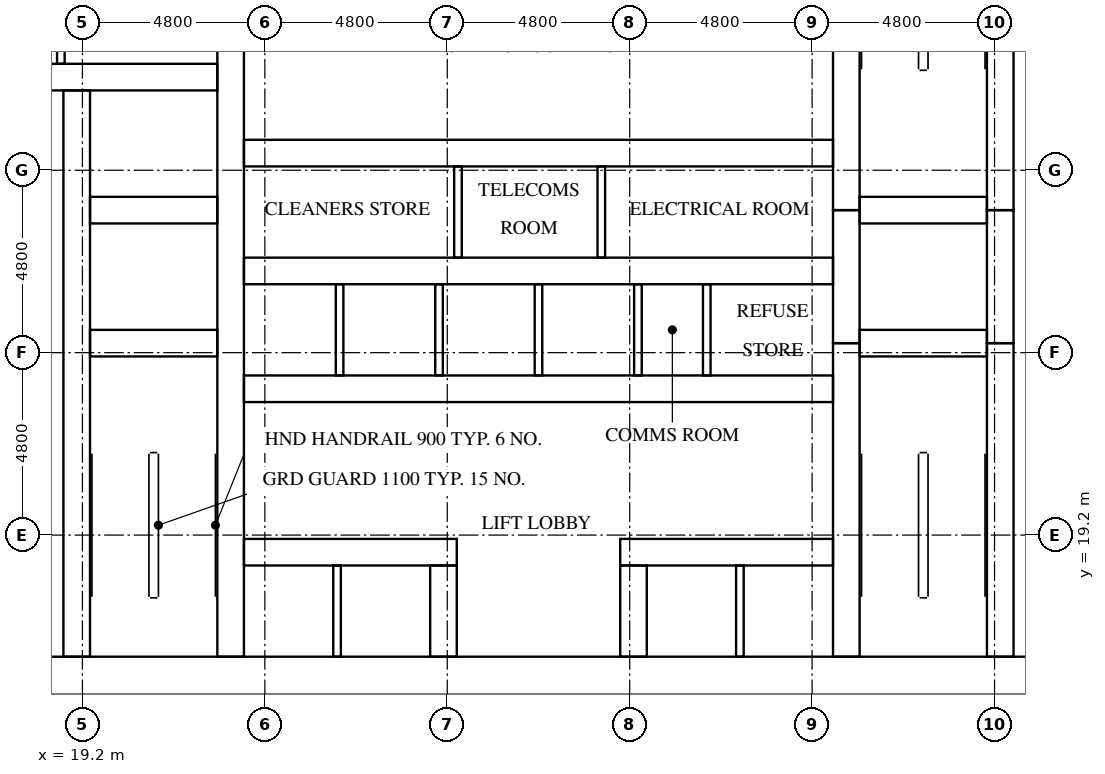
"""IFC4 building model, lengths in metres.
Left out: names, types, materials, properties, quantities, classifications, styles, units other than length and angle.
Written with IfcOpenShell. Run it as: python <this file> out.ifc"""

import sys

from ifc_helpers import new_model, si_unit, direction, frame, frame_2d, origin, place, context, subcontext, project, spatial, rectangle, extrude, element, fill, save


model = new_model("IFC4")
c1 = context("Model", 3, precision=1e-05, world=origin(), true_north=direction((0.0, 1.0)))
c2 = subcontext(c1, "Body", "Model", "MODEL_VIEW")
j1 = project(units=[si_unit("LENGTHUNIT", "METRE"), si_unit("PLANEANGLEUNIT", "RADIAN")], contexts=[c1])
p1 = place(None, origin())
s1 = spatial("IfcSite", under=j1, at=p1, CompositionType="ELEMENT")
p2 = place(p1, origin())
s2 = spatial("IfcBuilding", under=s1, at=p2, CompositionType="ELEMENT")
p3 = place(p2, frame((0.0, 0.0, 19.5)))
s3 = spatial("IfcBuildingStorey", under=s2, at=p3, CompositionType="ELEMENT", Elevation=19.5)
p4 = place(p3, frame((15.0, 15.5, 0.0), z_axis=(0.0, 0.0, 1.0), x_axis=(1.0, 0.0, 0.0)))
e1 = element("IfcWall", 1, at=p4, inside=s3, PredefinedType="SHEAR", context=c2, shape_type="SweptSolid", body=[
    extrude(rectangle(XDim=32.4, YDim=1.0, at=frame_2d((16.2, 0.0))), origin(), (0.0, 0.0, 1.0), 4.1),
])
p5 = place(p4, frame((15.3, 0.0, 0.0)))
e2 = element("IfcOpeningElement", 2, at=p5, cuts=e1, PredefinedType="OPENING", context=c2, shape_type="SweptSolid", body=[
    extrude(rectangle(XDim=1.8, YDim=2.1, at=frame_2d((0.9, 1.05))), frame((0.0, 0.51, 0.0), z_axis=(0.0, -1.0, 0.0), x_axis=(1.0, 0.0, 0.0)), (0.0, 0.0, 1.0), 1.02),
])
p6 = place(p3, frame((19.05, 16.0, 0.0), z_axis=(0.0, 0.0, 1.0), x_axis=(0.0, 1.0, 0.0)))
e3 = element("IfcWall", 3, at=p6, inside=s3, PredefinedType="SHEAR", context=c2, shape_type="SweptSolid", body=[
    extrude(rectangle(XDim=14.9, YDim=0.7, at=frame_2d((7.45, 0.0))), origin(), (0.0, 0.0, 1.0), 4.1),
])
p7 = place(p6, frame((9.45, 0.0, 0.0)))
e4 = element("IfcOpeningElement", 4, at=p7, cuts=e3, PredefinedType="OPENING", context=c2, shape_type="SweptSolid", body=[
    extrude(rectangle(XDim=1.1, YDim=2.1, at=frame_2d((0.55, 1.05))), frame((0.0, 0.36, 0.0), z_axis=(0.0, -1.0, 0.0), x_axis=(1.0, 0.0, 0.0)), (0.0, 0.0, 1.0), 0.72),
])
p8 = place(p6, frame((12.95, 0.0, 0.0)))
e5 = element("IfcOpeningElement", 5, at=p8, cuts=e3, PredefinedType="OPENING", context=c2, shape_type="SweptSolid", body=[
    extrude(rectangle(XDim=1.1, YDim=2.1, at=frame_2d((0.55, 1.05))), frame((0.0, 0.36, 0.0), z_axis=(0.0, -1.0, 0.0), x_axis=(1.0, 0.0, 0.0)), (0.0, 0.0, 1.0), 0.72),
])
p9 = place(p6, frame((0.2, 0.0, 0.0)))
e6 = element("IfcOpeningElement", 6, at=p9, cuts=e3, PredefinedType="OPENING", context=c2, shape_type="SweptSolid", body=[
    extrude(rectangle(XDim=1.2, YDim=2.1, at=frame_2d((0.6, 1.05))), frame((0.0, 0.36, 0.0), z_axis=(0.0, -1.0, 0.0), x_axis=(1.0, 0.0, 0.0)), (0.0, 0.0, 1.0), 0.72),
])
p10 = place(p3, frame((23.1, 16.0, 0.0), z_axis=(0.0, 0.0, 1.0), x_axis=(0.0, 1.0, 0.0)))
e7 = element("IfcWall", 7, at=p10, inside=s3, PredefinedType="SHEAR", context=c2, shape_type="SweptSolid", body=[
    extrude(rectangle(XDim=20.8, YDim=0.7, at=frame_2d((10.4, 0.0))), origin(), (0.0, 0.0, 1.0), 4.1),
])
p11 = place(p3, frame((39.3, 16.0, 0.0), z_axis=(0.0, 0.0, 1.0), x_axis=(0.0, 1.0, 0.0)))
e8 = element("IfcWall", 8, at=p11, inside=s3, PredefinedType="SHEAR", context=c2, shape_type="SweptSolid", body=[
    extrude(rectangle(XDim=8.25, YDim=0.7, at=frame_2d((4.125, 0.0))), origin(), (0.0, 0.0, 1.0), 4.1),
])
p12 = place(p3, frame((39.3, 24.25, 0.0), z_axis=(0.0, 0.0, 1.0), x_axis=(0.0, 1.0, 0.0)))
e9 = element("IfcWall", 9, at=p12, inside=s3, PredefinedType="SHEAR", context=c2, shape_type="SweptSolid", body=[
    extrude(rectangle(XDim=3.5, YDim=0.7, at=frame_2d((1.75, 0.0))), origin(), (0.0, 0.0, 1.0), 4.1),
])
p13 = place(p3, frame((39.3, 27.75, 0.0), z_axis=(0.0, 0.0, 1.0), x_axis=(0.0, 1.0, 0.0)))
e10 = element("IfcWall", 10, at=p13, inside=s3, PredefinedType="SHEAR", context=c2, shape_type="SweptSolid", body=[
    extrude(rectangle(XDim=9.05, YDim=0.7, at=frame_2d((4.525, 0.0))), origin(), (0.0, 0.0, 1.0), 4.1),
])
p14 = place(p3, frame((43.35, 16.0, 0.0), z_axis=(0.0, 0.0, 1.0), x_axis=(0.0, 1.0, 0.0)))
e11 = element("IfcWall", 11, at=p14, inside=s3, PredefinedType="SHEAR", context=c2, shape_type="SweptSolid", body=[
    extrude(rectangle(XDim=8.25, YDim=0.7, at=frame_2d((4.125, 0.0))), origin(), (0.0, 0.0, 1.0), 4.1),
])
p15 = place(p14, frame((0.2, 0.0, 0.0)))
e12 = element("IfcOpeningElement", 12, at=p15, cuts=e11, PredefinedType="OPENING", context=c2, shape_type="SweptSolid", body=[
    extrude(rectangle(XDim=1.2, YDim=2.1, at=frame_2d((0.6, 1.05))), frame((0.0, 0.36, 0.0), z_axis=(0.0, -1.0, 0.0), x_axis=(1.0, 0.0, 0.0)), (0.0, 0.0, 1.0), 0.72),
])
p16 = place(p3, frame((43.35, 24.25, 0.0), z_axis=(0.0, 0.0, 1.0), x_axis=(0.0, 1.0, 0.0)))
e13 = element("IfcWall", 13, at=p16, inside=s3, PredefinedType="SHEAR", context=c2, shape_type="SweptSolid", body=[
    extrude(rectangle(XDim=3.5, YDim=0.7, at=frame_2d((1.75, 0.0))), origin(), (0.0, 0.0, 1.0), 4.1),
])
p17 = place(p16, frame((1.2, 0.0, 0.0)))
e14 = element("IfcOpeningElement", 14, at=p17, cuts=e13, PredefinedType="OPENING", context=c2, shape_type="SweptSolid", body=[
    extrude(rectangle(XDim=1.1, YDim=2.1, at=frame_2d((0.55, 1.05))), frame((0.0, 0.36, 0.0), z_axis=(0.0, -1.0, 0.0), x_axis=(1.0, 0.0, 0.0)), (0.0, 0.0, 1.0), 0.72),
])
p18 = place(p3, frame((43.35, 27.75, 0.0), z_axis=(0.0, 0.0, 1.0), x_axis=(0.0, 1.0, 0.0)))
e15 = element("IfcWall", 15, at=p18, inside=s3, PredefinedType="SHEAR", context=c2, shape_type="SweptSolid", body=[
    extrude(rectangle(XDim=9.05, YDim=0.7, at=frame_2d((4.525, 0.0))), origin(), (0.0, 0.0, 1.0), 4.1),
])
p19 = place(p18, frame((7.65, 0.0, 0.0)))
e16 = element("IfcOpeningElement", 16, at=p19, cuts=e15, PredefinedType="OPENING", context=c2, shape_type="SweptSolid", body=[
    extrude(rectangle(XDim=1.2, YDim=2.1, at=frame_2d((0.6, 1.05))), frame((0.0, 0.36, 0.0), z_axis=(0.0, -1.0, 0.0), x_axis=(1.0, 0.0, 0.0)), (0.0, 0.0, 1.0), 0.72),
])
for number, where, z_axis, x_axis in (
    (17, (19.4, 24.25, 0.0), (0.0, 0.0, 1.0), (1.0, 0.0, 0.0)),
    (18, (19.4, 27.75, 0.0), (0.0, 0.0, 1.0), (1.0, 0.0, 0.0)),
):
    element("IfcWall", number, at=place(p3, frame(where, z_axis=z_axis, x_axis=x_axis)), inside=s3, PredefinedType="SHEAR", context=c2, shape_type="SweptSolid", body=[
        extrude(rectangle(XDim=3.35, YDim=0.7, at=frame_2d((1.675, 0.0))), origin(), (0.0, 0.0, 1.0), 4.1),
    ])
p20 = place(p3, frame((16.0, 31.25, 0.0), z_axis=(0.0, 0.0, 1.0), x_axis=(1.0, 0.0, 0.0)))
e19 = element("IfcWall", 19, at=p20, inside=s3, PredefinedType="SHEAR", context=c2, shape_type="SweptSolid", body=[
    extrude(rectangle(XDim=6.75, YDim=0.7, at=frame_2d((3.375, 0.0))), origin(), (0.0, 0.0, 1.0), 4.1),
])
for number, where, z_axis, x_axis in (
    (20, (39.65, 24.25, 0.0), (0.0, 0.0, 1.0), (1.0, 0.0, 0.0)),
    (21, (39.65, 27.75, 0.0), (0.0, 0.0, 1.0), (1.0, 0.0, 0.0)),
):
    element("IfcWall", number, at=place(p3, frame(where, z_axis=z_axis, x_axis=x_axis)), inside=s3, PredefinedType="SHEAR", context=c2, shape_type="SweptSolid", body=[
        extrude(rectangle(XDim=3.35, YDim=0.7, at=frame_2d((1.675, 0.0))), origin(), (0.0, 0.0, 1.0), 4.1),
    ])
p21 = place(p3, frame((23.45, 18.75, 0.0), z_axis=(0.0, 0.0, 1.0), x_axis=(1.0, 0.0, 0.0)))
e22 = element("IfcWall", 22, at=p21, inside=s3, PredefinedType="SHEAR", context=c2, shape_type="SweptSolid", body=[
    extrude(rectangle(XDim=5.6, YDim=0.7, at=frame_2d((2.8, 0.0))), origin(), (0.0, 0.0, 1.0), 4.1),
])
p22 = place(p21, frame((0.625, 0.0, 0.0)))
e23 = element("IfcOpeningElement", 23, at=p22, cuts=e22, PredefinedType="OPENING", context=c2, shape_type="SweptSolid", body=[
    extrude(rectangle(XDim=1.1, YDim=2.1, at=frame_2d((0.55, 1.05))), frame((0.0, 0.36, 0.0), z_axis=(0.0, -1.0, 0.0), x_axis=(1.0, 0.0, 0.0)), (0.0, 0.0, 1.0), 0.72),
])
p23 = place(p21, frame((3.175, 0.0, 0.0)))
e24 = element("IfcOpeningElement", 24, at=p23, cuts=e22, PredefinedType="OPENING", context=c2, shape_type="SweptSolid", body=[
    extrude(rectangle(XDim=1.1, YDim=2.1, at=frame_2d((0.55, 1.05))), frame((0.0, 0.36, 0.0), z_axis=(0.0, -1.0, 0.0), x_axis=(1.0, 0.0, 0.0)), (0.0, 0.0, 1.0), 0.72),
])
p24 = place(p3, frame((33.35, 18.75, 0.0), z_axis=(0.0, 0.0, 1.0), x_axis=(1.0, 0.0, 0.0)))
e25 = element("IfcWall", 25, at=p24, inside=s3, PredefinedType="SHEAR", context=c2, shape_type="SweptSolid", body=[
    extrude(rectangle(XDim=5.6, YDim=0.7, at=frame_2d((2.8, 0.0))), origin(), (0.0, 0.0, 1.0), 4.1),
])
p25 = place(p24, frame((1.325, 0.0, 0.0)))
e26 = element("IfcOpeningElement", 26, at=p25, cuts=e25, PredefinedType="OPENING", context=c2, shape_type="SweptSolid", body=[
    extrude(rectangle(XDim=1.1, YDim=2.1, at=frame_2d((0.55, 1.05))), frame((0.0, 0.36, 0.0), z_axis=(0.0, -1.0, 0.0), x_axis=(1.0, 0.0, 0.0)), (0.0, 0.0, 1.0), 0.72),
])
p26 = place(p24, frame((3.875, 0.0, 0.0)))
e27 = element("IfcOpeningElement", 27, at=p26, cuts=e25, PredefinedType="OPENING", context=c2, shape_type="SweptSolid", body=[
    extrude(rectangle(XDim=1.1, YDim=2.1, at=frame_2d((0.55, 1.05))), frame((0.0, 0.36, 0.0), z_axis=(0.0, -1.0, 0.0), x_axis=(1.0, 0.0, 0.0)), (0.0, 0.0, 1.0), 0.72),
])
p27 = place(p3, frame((23.45, 23.05, 0.0), z_axis=(0.0, 0.0, 1.0), x_axis=(1.0, 0.0, 0.0)))
e28 = element("IfcWall", 28, at=p27, inside=s3, PredefinedType="SHEAR", context=c2, shape_type="SweptSolid", body=[
    extrude(rectangle(XDim=15.5, YDim=0.7, at=frame_2d((7.75, 0.0))), origin(), (0.0, 0.0, 1.0), 4.1),
])
p28 = place(p27, frame((0.658, 0.0, 0.0)))
e29 = element("IfcOpeningElement", 29, at=p28, cuts=e28, PredefinedType="OPENING", context=c2, shape_type="SweptSolid", body=[
    extrude(rectangle(XDim=1.1, YDim=2.1, at=frame_2d((0.55, 1.05))), frame((0.0, 0.36, 0.0), z_axis=(0.0, -1.0, 0.0), x_axis=(1.0, 0.0, 0.0)), (0.0, 0.0, 1.0), 0.72),
])
p29 = place(p27, frame((3.275, 0.0, 0.0)))
e30 = element("IfcOpeningElement", 30, at=p29, cuts=e28, PredefinedType="OPENING", context=c2, shape_type="SweptSolid", body=[
    extrude(rectangle(XDim=1.1, YDim=2.1, at=frame_2d((0.55, 1.05))), frame((0.0, 0.36, 0.0), z_axis=(0.0, -1.0, 0.0), x_axis=(1.0, 0.0, 0.0)), (0.0, 0.0, 1.0), 0.72),
])
p30 = place(p27, frame((10.772, 0.0, 0.0)))
e31 = element("IfcOpeningElement", 31, at=p30, cuts=e28, PredefinedType="OPENING", context=c2, shape_type="SweptSolid", body=[
    extrude(rectangle(XDim=1.0, YDim=2.1, at=frame_2d((0.5, 1.05))), frame((0.0, 0.36, 0.0), z_axis=(0.0, -1.0, 0.0), x_axis=(1.0, 0.0, 0.0)), (0.0, 0.0, 1.0), 0.72),
])
p31 = place(p27, frame((13.389, 0.0, 0.0)))
e32 = element("IfcOpeningElement", 32, at=p31, cuts=e28, PredefinedType="OPENING", context=c2, shape_type="SweptSolid", body=[
    extrude(rectangle(XDim=1.0, YDim=2.1, at=frame_2d((0.5, 1.05))), frame((0.0, 0.36, 0.0), z_axis=(0.0, -1.0, 0.0), x_axis=(1.0, 0.0, 0.0)), (0.0, 0.0, 1.0), 0.72),
])
p32 = place(p3, frame((23.45, 26.15, 0.0), z_axis=(0.0, 0.0, 1.0), x_axis=(1.0, 0.0, 0.0)))
e33 = element("IfcWall", 33, at=p32, inside=s3, PredefinedType="SHEAR", context=c2, shape_type="SweptSolid", body=[
    extrude(rectangle(XDim=15.5, YDim=0.7, at=frame_2d((7.75, 0.0))), origin(), (0.0, 0.0, 1.0), 4.1),
])
p33 = place(p3, frame((23.45, 29.25, 0.0), z_axis=(0.0, 0.0, 1.0), x_axis=(1.0, 0.0, 0.0)))
e34 = element("IfcWall", 34, at=p33, inside=s3, PredefinedType="SHEAR", context=c2, shape_type="SweptSolid", body=[
    extrude(rectangle(XDim=15.5, YDim=0.7, at=frame_2d((7.75, 0.0))), origin(), (0.0, 0.0, 1.0), 4.1),
])
p34 = place(p33, frame((2.266, 0.0, 0.0)))
e35 = element("IfcOpeningElement", 35, at=p34, cuts=e34, PredefinedType="OPENING", context=c2, shape_type="SweptSolid", body=[
    extrude(rectangle(XDim=1.0, YDim=2.1, at=frame_2d((0.5, 1.05))), frame((0.0, 0.36, 0.0), z_axis=(0.0, -1.0, 0.0), x_axis=(1.0, 0.0, 0.0)), (0.0, 0.0, 1.0), 0.72),
])
p35 = place(p33, frame((7.018, 0.0, 0.0)))
e36 = element("IfcOpeningElement", 36, at=p35, cuts=e34, PredefinedType="OPENING", context=c2, shape_type="SweptSolid", body=[
    extrude(rectangle(XDim=1.0, YDim=2.1, at=frame_2d((0.5, 1.05))), frame((0.0, 0.36, 0.0), z_axis=(0.0, -1.0, 0.0), x_axis=(1.0, 0.0, 0.0)), (0.0, 0.0, 1.0), 0.72),
])
p36 = place(p33, frame((12.002, 0.0, 0.0)))
e37 = element("IfcOpeningElement", 37, at=p36, cuts=e34, PredefinedType="OPENING", context=c2, shape_type="SweptSolid", body=[
    extrude(rectangle(XDim=1.0, YDim=2.1, at=frame_2d((0.5, 1.05))), frame((0.0, 0.36, 0.0), z_axis=(0.0, -1.0, 0.0), x_axis=(1.0, 0.0, 0.0)), (0.0, 0.0, 1.0), 0.72),
])
for number, where, z_axis, x_axis in (
    (38, (28.7, 16.0, 0.0), (0.0, 0.0, 1.0), (0.0, 1.0, 0.0)),
    (39, (33.7, 16.0, 0.0), (0.0, 0.0, 1.0), (0.0, 1.0, 0.0)),
):
    element("IfcWall", number, at=place(p3, frame(where, z_axis=z_axis, x_axis=x_axis)), inside=s3, PredefinedType="SHEAR", context=c2, shape_type="SweptSolid", body=[
        extrude(rectangle(XDim=2.4, YDim=0.7, at=frame_2d((1.2, 0.0))), origin(), (0.0, 0.0, 1.0), 4.1),
    ])
for number, where, z_axis, x_axis in (
    (40, (25.967, 23.4, 0.0), (0.0, 0.0, 1.0), (0.0, 1.0, 0.0)),
    (41, (28.583, 23.4, 0.0), (0.0, 0.0, 1.0), (0.0, 1.0, 0.0)),
    (42, (31.2, 23.4, 0.0), (0.0, 0.0, 1.0), (0.0, 1.0, 0.0)),
    (43, (33.817, 23.4, 0.0), (0.0, 0.0, 1.0), (0.0, 1.0, 0.0)),
):
    element("IfcWall", number, at=place(p3, frame(where, z_axis=z_axis, x_axis=x_axis)), inside=s3, PredefinedType="SOLIDWALL", context=c2, shape_type="SweptSolid", body=[
        extrude(rectangle(XDim=2.4, YDim=0.2, at=frame_2d((1.2, 0.0))), origin(), (0.0, 0.0, 1.0), 4.1),
    ])
for number, where, z_axis, x_axis in (
    (44, (25.9, 16.0, 0.0), (0.0, 0.0, 1.0), (0.0, 1.0, 0.0)),
    (45, (36.5, 16.0, 0.0), (0.0, 0.0, 1.0), (0.0, 1.0, 0.0)),
):
    element("IfcWall", number, at=place(p3, frame(where, z_axis=z_axis, x_axis=x_axis)), inside=s3, PredefinedType="SOLIDWALL", context=c2, shape_type="SweptSolid", body=[
        extrude(rectangle(XDim=2.4, YDim=0.2, at=frame_2d((1.2, 0.0))), origin(), (0.0, 0.0, 1.0), 4.1),
    ])
p37 = place(p3, frame((18.633, 31.6, 0.0), z_axis=(0.0, 0.0, 1.0), x_axis=(0.0, 1.0, 0.0)))
e46 = element("IfcWall", 46, at=p37, inside=s3, PredefinedType="PARTITIONING", context=c2, shape_type="SweptSolid", body=[
    extrude(rectangle(XDim=5.2, YDim=0.2, at=frame_2d((2.6, 0.0))), origin(), (0.0, 0.0, 1.0), 4.1),
])
p38 = place(p3, frame((35.628, 23.4, 0.0), z_axis=(0.0, 0.0, 1.0), x_axis=(0.0, 1.0, 0.0)))
e47 = element("IfcWall", 47, at=p38, inside=s3, PredefinedType="PARTITIONING", context=c2, shape_type="SweptSolid", body=[
    extrude(rectangle(XDim=2.4, YDim=0.2, at=frame_2d((1.2, 0.0))), origin(), (0.0, 0.0, 1.0), 4.1),
])
for number, where, z_axis, x_axis in (
    (48, (29.082, 26.5, 0.0), (0.0, 0.0, 1.0), (0.0, 1.0, 0.0)),
    (49, (32.853, 26.5, 0.0), (0.0, 0.0, 1.0), (0.0, 1.0, 0.0)),
):
    element("IfcWall", number, at=place(p3, frame(where, z_axis=z_axis, x_axis=x_axis)), inside=s3, PredefinedType="PARTITIONING", context=c2, shape_type="SweptSolid", body=[
        extrude(rectangle(XDim=2.4, YDim=0.2, at=frame_2d((1.2, 0.0))), origin(), (0.0, 0.0, 1.0), 4.1),
    ])
p39 = place(p22, origin())
e50 = element("IfcDoor", 50, at=p39, inside=s3, OperationType="DOUBLE_DOOR_SLIDING", PredefinedType="DOOR", context=c2, shape_type="SweptSolid", body=[
    extrude(rectangle(XDim=1.1, YDim=2.1, at=frame_2d((0.55, 1.05))), frame((0.0, 0.025, 0.0), z_axis=(0.0, -1.0, 0.0), x_axis=(1.0, 0.0, 0.0)), (0.0, 0.0, 1.0), 0.05),
])
fill(e23, e50)
p40 = place(p23, origin())
e51 = element("IfcDoor", 51, at=p40, inside=s3, OperationType="DOUBLE_DOOR_SLIDING", PredefinedType="DOOR", context=c2, shape_type="SweptSolid", body=[
    extrude(rectangle(XDim=1.1, YDim=2.1, at=frame_2d((0.55, 1.05))), frame((0.0, 0.025, 0.0), z_axis=(0.0, -1.0, 0.0), x_axis=(1.0, 0.0, 0.0)), (0.0, 0.0, 1.0), 0.05),
])
fill(e24, e51)
p41 = place(p25, origin())
e52 = element("IfcDoor", 52, at=p41, inside=s3, OperationType="DOUBLE_DOOR_SLIDING", PredefinedType="DOOR", context=c2, shape_type="SweptSolid", body=[
    extrude(rectangle(XDim=1.1, YDim=2.1, at=frame_2d((0.55, 1.05))), frame((0.0, 0.025, 0.0), z_axis=(0.0, -1.0, 0.0), x_axis=(1.0, 0.0, 0.0)), (0.0, 0.0, 1.0), 0.05),
])
fill(e26, e52)
p42 = place(p26, origin())
e53 = element("IfcDoor", 53, at=p42, inside=s3, OperationType="DOUBLE_DOOR_SLIDING", PredefinedType="DOOR", context=c2, shape_type="SweptSolid", body=[
    extrude(rectangle(XDim=1.1, YDim=2.1, at=frame_2d((0.55, 1.05))), frame((0.0, 0.025, 0.0), z_axis=(0.0, -1.0, 0.0), x_axis=(1.0, 0.0, 0.0)), (0.0, 0.0, 1.0), 0.05),
])
fill(e27, e53)
p43 = place(p28, origin())
e54 = element("IfcDoor", 54, at=p43, inside=s3, OperationType="DOUBLE_DOOR_SLIDING", PredefinedType="DOOR", context=c2, shape_type="SweptSolid", body=[
    extrude(rectangle(XDim=1.1, YDim=2.1, at=frame_2d((0.55, 1.05))), frame((0.0, 0.025, 0.0), z_axis=(0.0, -1.0, 0.0), x_axis=(1.0, 0.0, 0.0)), (0.0, 0.0, 1.0), 0.05),
])
fill(e29, e54)
p44 = place(p29, origin())
e55 = element("IfcDoor", 55, at=p44, inside=s3, OperationType="DOUBLE_DOOR_SLIDING", PredefinedType="DOOR", context=c2, shape_type="SweptSolid", body=[
    extrude(rectangle(XDim=1.1, YDim=2.1, at=frame_2d((0.55, 1.05))), frame((0.0, 0.025, 0.0), z_axis=(0.0, -1.0, 0.0), x_axis=(1.0, 0.0, 0.0)), (0.0, 0.0, 1.0), 0.05),
])
fill(e30, e55)
p45 = place(p7, origin())
e56 = element("IfcDoor", 56, at=p45, inside=s3, OperationType="DOUBLE_DOOR_SLIDING", PredefinedType="DOOR", context=c2, shape_type="SweptSolid", body=[
    extrude(rectangle(XDim=1.1, YDim=2.1, at=frame_2d((0.55, 1.05))), frame((0.0, 0.025, 0.0), z_axis=(0.0, -1.0, 0.0), x_axis=(1.0, 0.0, 0.0)), (0.0, 0.0, 1.0), 0.05),
])
fill(e4, e56)
p46 = place(p8, origin())
e57 = element("IfcDoor", 57, at=p46, inside=s3, OperationType="DOUBLE_DOOR_SLIDING", PredefinedType="DOOR", context=c2, shape_type="SweptSolid", body=[
    extrude(rectangle(XDim=1.1, YDim=2.1, at=frame_2d((0.55, 1.05))), frame((0.0, 0.025, 0.0), z_axis=(0.0, -1.0, 0.0), x_axis=(1.0, 0.0, 0.0)), (0.0, 0.0, 1.0), 0.05),
])
fill(e5, e57)
p47 = place(p17, origin())
e58 = element("IfcDoor", 58, at=p47, inside=s3, OperationType="DOUBLE_DOOR_SLIDING", PredefinedType="DOOR", context=c2, shape_type="SweptSolid", body=[
    extrude(rectangle(XDim=1.1, YDim=2.1, at=frame_2d((0.55, 1.05))), frame((0.0, 0.025, 0.0), z_axis=(0.0, -1.0, 0.0), x_axis=(1.0, 0.0, 0.0)), (0.0, 0.0, 1.0), 0.05),
])
fill(e14, e58)
p48 = place(p9, frame((1.2, 0.0, 0.0), z_axis=(0.0, 0.0, 1.0), x_axis=(-1.0, 0.0, 0.0)))
e59 = element("IfcDoor", 59, at=p48, inside=s3, OperationType="SINGLE_SWING_RIGHT", PredefinedType="DOOR", context=c2, shape_type="SweptSolid", body=[
    extrude(rectangle(XDim=1.2, YDim=2.1, at=frame_2d((0.6, 1.05))), frame((0.0, 0.025, 0.0), z_axis=(0.0, -1.0, 0.0), x_axis=(1.0, 0.0, 0.0)), (0.0, 0.0, 1.0), 0.05),
])
fill(e6, e59)
p49 = place(p15, origin())
e60 = element("IfcDoor", 60, at=p49, inside=s3, OperationType="SINGLE_SWING_LEFT", PredefinedType="DOOR", context=c2, shape_type="SweptSolid", body=[
    extrude(rectangle(XDim=1.2, YDim=2.1, at=frame_2d((0.6, 1.05))), frame((0.0, 0.025, 0.0), z_axis=(0.0, -1.0, 0.0), x_axis=(1.0, 0.0, 0.0)), (0.0, 0.0, 1.0), 0.05),
])
fill(e12, e60)
p50 = place(p5, frame((1.8, 0.0, 0.0), z_axis=(0.0, 0.0, 1.0), x_axis=(-1.0, 0.0, 0.0)))
e61 = element("IfcDoor", 61, at=p50, inside=s3, OperationType="DOUBLE_DOOR_SINGLE_SWING", PredefinedType="DOOR", context=c2, shape_type="SweptSolid", body=[
    extrude(rectangle(XDim=1.8, YDim=2.1, at=frame_2d((0.9, 1.05))), frame((0.0, 0.025, 0.0), z_axis=(0.0, -1.0, 0.0), x_axis=(1.0, 0.0, 0.0)), (0.0, 0.0, 1.0), 0.05),
])
fill(e2, e61)
p51 = place(p30, frame((1.0, 0.0, 0.0), z_axis=(0.0, 0.0, 1.0), x_axis=(-1.0, 0.0, 0.0)))
e62 = element("IfcDoor", 62, at=p51, inside=s3, OperationType="SINGLE_SWING_LEFT", PredefinedType="DOOR", context=c2, shape_type="SweptSolid", body=[
    extrude(rectangle(XDim=1.0, YDim=2.1, at=frame_2d((0.5, 1.05))), frame((0.0, 0.025, 0.0), z_axis=(0.0, -1.0, 0.0), x_axis=(1.0, 0.0, 0.0)), (0.0, 0.0, 1.0), 0.05),
])
fill(e31, e62)
p52 = place(p31, frame((1.0, 0.0, 0.0), z_axis=(0.0, 0.0, 1.0), x_axis=(-1.0, 0.0, 0.0)))
e63 = element("IfcDoor", 63, at=p52, inside=s3, OperationType="SINGLE_SWING_RIGHT", PredefinedType="DOOR", context=c2, shape_type="SweptSolid", body=[
    extrude(rectangle(XDim=1.0, YDim=2.1, at=frame_2d((0.5, 1.05))), frame((0.0, 0.025, 0.0), z_axis=(0.0, -1.0, 0.0), x_axis=(1.0, 0.0, 0.0)), (0.0, 0.0, 1.0), 0.05),
])
fill(e32, e63)
p53 = place(p34, origin())
e64 = element("IfcDoor", 64, at=p53, inside=s3, OperationType="SINGLE_SWING_LEFT", PredefinedType="DOOR", context=c2, shape_type="SweptSolid", body=[
    extrude(rectangle(XDim=1.0, YDim=2.1, at=frame_2d((0.5, 1.05))), frame((0.0, 0.025, 0.0), z_axis=(0.0, -1.0, 0.0), x_axis=(1.0, 0.0, 0.0)), (0.0, 0.0, 1.0), 0.05),
])
fill(e35, e64)
p54 = place(p35, origin())
e65 = element("IfcDoor", 65, at=p54, inside=s3, OperationType="SINGLE_SWING_RIGHT", PredefinedType="DOOR", context=c2, shape_type="SweptSolid", body=[
    extrude(rectangle(XDim=1.0, YDim=2.1, at=frame_2d((0.5, 1.05))), frame((0.0, 0.025, 0.0), z_axis=(0.0, -1.0, 0.0), x_axis=(1.0, 0.0, 0.0)), (0.0, 0.0, 1.0), 0.05),
])
fill(e36, e65)
p55 = place(p36, origin())
e66 = element("IfcDoor", 66, at=p55, inside=s3, OperationType="SINGLE_SWING_LEFT", PredefinedType="DOOR", context=c2, shape_type="SweptSolid", body=[
    extrude(rectangle(XDim=1.0, YDim=2.1, at=frame_2d((0.5, 1.05))), frame((0.0, 0.025, 0.0), z_axis=(0.0, -1.0, 0.0), x_axis=(1.0, 0.0, 0.0)), (0.0, 0.0, 1.0), 0.05),
])
fill(e37, e66)
save(model, sys.argv[1])
